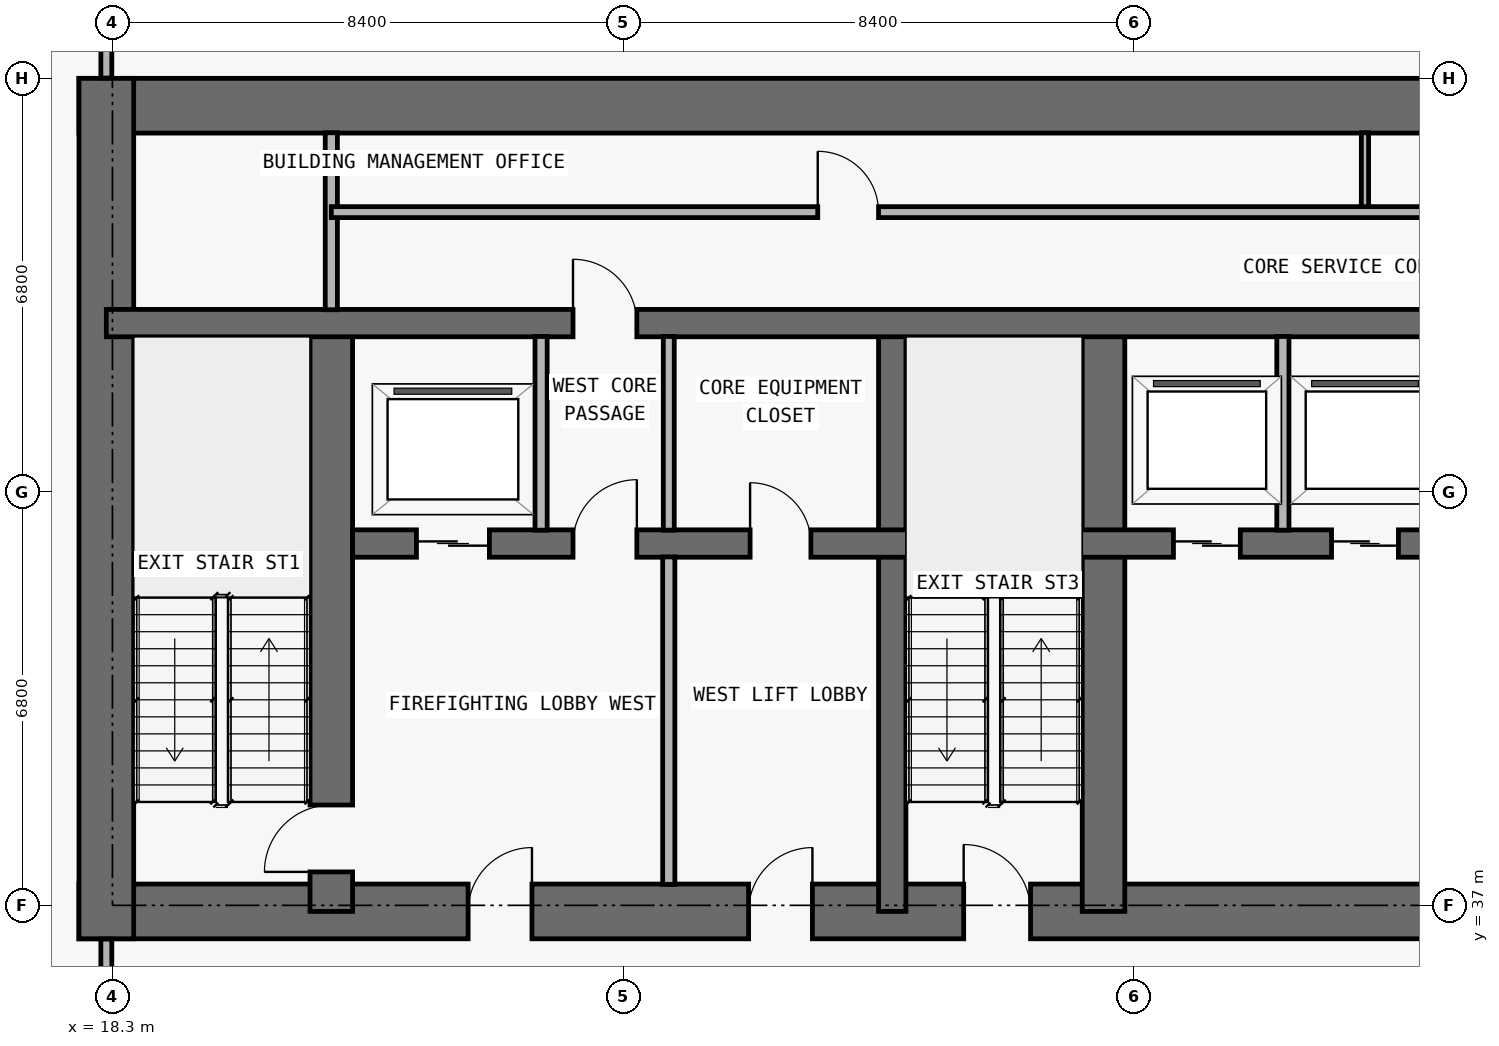
"""IFC4 building model, lengths in metres.
Left out: names, types, materials, properties, quantities, classifications, styles, units other than length and angle.
Written with IfcOpenShell. Run it as: python <this file> out.ifc"""

import sys

from ifc_helpers import new_model, si_unit, direction, frame, frame_2d, origin, place, context, subcontext, project, spatial, rectangle, extrude, element, fill, save


model = new_model("IFC4")
c1 = context("Model", 3, precision=1e-05, world=origin(), true_north=direction((0.0, 1.0)))
c2 = subcontext(c1, "Body", "Model", "MODEL_VIEW")
j1 = project(units=[si_unit("LENGTHUNIT", "METRE"), si_unit("PLANEANGLEUNIT", "RADIAN")], contexts=[c1])
p1 = place(None, origin())
s1 = spatial("IfcSite", under=j1, at=p1, CompositionType="ELEMENT")
p2 = place(p1, origin())
s2 = spatial("IfcBuilding", under=s1, at=p2, CompositionType="ELEMENT")
p3 = place(p2, frame((0.0, 0.0, -9.0)))
s3 = spatial("IfcBuildingStorey", under=s2, at=p3, CompositionType="ELEMENT", Elevation=-9.0)
p4 = place(p3, frame((17.75, 36.9, 0.0), z_axis=(0.0, 0.0, 1.0), x_axis=(1.0, 0.0, 0.0)))
e1 = element("IfcWall", 1, at=p4, inside=s3, PredefinedType="SHEAR", context=c2, shape_type="SweptSolid", body=[
    extrude(rectangle(XDim=42.3, YDim=0.9, at=frame_2d((21.15, 0.0))), origin(), (0.0, 0.0, 1.0), 4.2),
])
p5 = place(p4, frame((14.55, 0.0, 0.0)))
e2 = element("IfcOpeningElement", 2, at=p5, cuts=e1, PredefinedType="OPENING", context=c2, shape_type="SweptSolid", body=[
    extrude(rectangle(XDim=1.1, YDim=2.15, at=frame_2d((0.55, 1.075))), frame((0.0, 0.46, 0.0), z_axis=(0.0, -1.0, 0.0), x_axis=(1.0, 0.0, 0.0)), (0.0, 0.0, 1.0), 0.92),
])
p6 = place(p4, frame((6.4, 0.0, 0.0)))
e3 = element("IfcOpeningElement", 3, at=p6, cuts=e1, PredefinedType="OPENING", context=c2, shape_type="SweptSolid", body=[
    extrude(rectangle(XDim=1.05, YDim=2.15, at=frame_2d((0.525, 1.075))), frame((0.0, 0.46, 0.0), z_axis=(0.0, -1.0, 0.0), x_axis=(1.0, 0.0, 0.0)), (0.0, 0.0, 1.0), 0.92),
])
p7 = place(p4, frame((34.9, 0.0, 0.0)))
e4 = element("IfcOpeningElement", 4, at=p7, cuts=e1, PredefinedType="OPENING", context=c2, shape_type="SweptSolid", body=[
    extrude(rectangle(XDim=1.05, YDim=2.15, at=frame_2d((0.525, 1.075))), frame((0.0, 0.46, 0.0), z_axis=(0.0, -1.0, 0.0), x_axis=(1.0, 0.0, 0.0)), (0.0, 0.0, 1.0), 0.92),
])
p8 = place(p4, frame((11.012, 0.0, 0.0)))
e5 = element("IfcOpeningElement", 5, at=p8, cuts=e1, PredefinedType="OPENING", context=c2, shape_type="SweptSolid", body=[
    extrude(rectangle(XDim=1.05, YDim=2.15, at=frame_2d((0.525, 1.075))), frame((0.0, 0.46, 0.0), z_axis=(0.0, -1.0, 0.0), x_axis=(1.0, 0.0, 0.0)), (0.0, 0.0, 1.0), 0.92),
])
p9 = place(p4, frame((24.25, 0.0, 0.0)))
e6 = element("IfcOpeningElement", 6, at=p9, cuts=e1, PredefinedType="OPENING", context=c2, shape_type="SweptSolid", body=[
    extrude(rectangle(XDim=1.05, YDim=2.15, at=frame_2d((0.525, 1.075))), frame((0.0, 0.46, 0.0), z_axis=(0.0, -1.0, 0.0), x_axis=(1.0, 0.0, 0.0)), (0.0, 0.0, 1.0), 0.92),
])
p10 = place(p3, frame((17.75, 50.15, 0.0), z_axis=(0.0, 0.0, 1.0), x_axis=(1.0, 0.0, 0.0)))
e7 = element("IfcWall", 7, at=p10, inside=s3, PredefinedType="SHEAR", context=c2, shape_type="SweptSolid", body=[
    extrude(rectangle(XDim=42.3, YDim=0.9, at=frame_2d((21.15, 0.0))), origin(), (0.0, 0.0, 1.0), 4.2),
])
p11 = place(p3, frame((18.2, 36.45, 0.0), z_axis=(0.0, 0.0, 1.0), x_axis=(0.0, 1.0, 0.0)))
e8 = element("IfcWall", 8, at=p11, inside=s3, PredefinedType="SHEAR", context=c2, shape_type="SweptSolid", body=[
    extrude(rectangle(XDim=14.15, YDim=0.9, at=frame_2d((7.075, 0.0))), origin(), (0.0, 0.0, 1.0), 4.2),
])
p12 = place(p3, frame((21.9, 36.9, 0.0), z_axis=(0.0, 0.0, 1.0), x_axis=(0.0, 1.0, 0.0)))
e9 = element("IfcWall", 9, at=p12, inside=s3, PredefinedType="SHEAR", context=c2, shape_type="SweptSolid", body=[
    extrude(rectangle(XDim=9.675, YDim=0.7, at=frame_2d((4.837, 0.0))), origin(), (0.0, 0.0, 1.0), 4.2),
])
p13 = place(p12, frame((0.65, 0.0, 0.0)))
e10 = element("IfcOpeningElement", 10, at=p13, cuts=e9, PredefinedType="OPENING", context=c2, shape_type="SweptSolid", body=[
    extrude(rectangle(XDim=1.1, YDim=2.15, at=frame_2d((0.55, 1.075))), frame((0.0, 0.36, 0.0), z_axis=(0.0, -1.0, 0.0), x_axis=(1.0, 0.0, 0.0)), (0.0, 0.0, 1.0), 0.72),
])
p14 = place(p3, frame((31.125, 36.9, 0.0), z_axis=(0.0, 0.0, 1.0), x_axis=(0.0, 1.0, 0.0)))
e11 = element("IfcWall", 11, at=p14, inside=s3, PredefinedType="SHEAR", context=c2, shape_type="SweptSolid", body=[
    extrude(rectangle(XDim=9.675, YDim=0.45, at=frame_2d((4.837, 0.0))), origin(), (0.0, 0.0, 1.0), 4.2),
])
p15 = place(p3, frame((34.6, 36.9, 0.0), z_axis=(0.0, 0.0, 1.0), x_axis=(0.0, 1.0, 0.0)))
e12 = element("IfcWall", 12, at=p15, inside=s3, PredefinedType="SHEAR", context=c2, shape_type="SweptSolid", body=[
    extrude(rectangle(XDim=9.675, YDim=0.7, at=frame_2d((4.837, 0.0))), origin(), (0.0, 0.0, 1.0), 4.2),
])
p16 = place(p3, frame((22.25, 42.95, 0.0), z_axis=(0.0, 0.0, 1.0), x_axis=(1.0, 0.0, 0.0)))
e13 = element("IfcWall", 13, at=p16, inside=s3, PredefinedType="SHEAR", context=c2, shape_type="SweptSolid", body=[
    extrude(rectangle(XDim=33.3, YDim=0.45, at=frame_2d((16.65, 0.0))), origin(), (0.0, 0.0, 1.0), 4.2),
])
p17 = place(p16, frame((1.05, 0.0, 0.0)))
e14 = element("IfcOpeningElement", 14, at=p17, cuts=e13, PredefinedType="OPENING", context=c2, shape_type="SweptSolid", body=[
    extrude(rectangle(XDim=1.2, YDim=2.2, at=frame_2d((0.6, 1.1))), frame((0.0, 0.235, 0.0), z_axis=(0.0, -1.0, 0.0), x_axis=(1.0, 0.0, 0.0)), (0.0, 0.0, 1.0), 0.47),
])
p18 = place(p16, frame((31.05, 0.0, 0.0)))
e15 = element("IfcOpeningElement", 15, at=p18, cuts=e13, PredefinedType="OPENING", context=c2, shape_type="SweptSolid", body=[
    extrude(rectangle(XDim=1.2, YDim=2.2, at=frame_2d((0.6, 1.1))), frame((0.0, 0.235, 0.0), z_axis=(0.0, -1.0, 0.0), x_axis=(1.0, 0.0, 0.0)), (0.0, 0.0, 1.0), 0.47),
])
p19 = place(p16, frame((13.5, 0.0, 0.0)))
e16 = element("IfcOpeningElement", 16, at=p19, cuts=e13, PredefinedType="OPENING", context=c2, shape_type="SweptSolid", body=[
    extrude(rectangle(XDim=1.1, YDim=2.2, at=frame_2d((0.55, 1.1))), frame((0.0, 0.235, 0.0), z_axis=(0.0, -1.0, 0.0), x_axis=(1.0, 0.0, 0.0)), (0.0, 0.0, 1.0), 0.47),
])
p20 = place(p16, frame((16.1, 0.0, 0.0)))
e17 = element("IfcOpeningElement", 17, at=p20, cuts=e13, PredefinedType="OPENING", context=c2, shape_type="SweptSolid", body=[
    extrude(rectangle(XDim=1.1, YDim=2.2, at=frame_2d((0.55, 1.1))), frame((0.0, 0.235, 0.0), z_axis=(0.0, -1.0, 0.0), x_axis=(1.0, 0.0, 0.0)), (0.0, 0.0, 1.0), 0.47),
])
p21 = place(p16, frame((18.7, 0.0, 0.0)))
e18 = element("IfcOpeningElement", 18, at=p21, cuts=e13, PredefinedType="OPENING", context=c2, shape_type="SweptSolid", body=[
    extrude(rectangle(XDim=1.1, YDim=2.2, at=frame_2d((0.55, 1.1))), frame((0.0, 0.235, 0.0), z_axis=(0.0, -1.0, 0.0), x_axis=(1.0, 0.0, 0.0)), (0.0, 0.0, 1.0), 0.47),
])
p22 = place(p16, frame((3.625, 0.0, 0.0)))
e19 = element("IfcOpeningElement", 19, at=p22, cuts=e13, PredefinedType="OPENING", context=c2, shape_type="SweptSolid", body=[
    extrude(rectangle(XDim=1.05, YDim=2.15, at=frame_2d((0.525, 1.075))), frame((0.0, 0.235, 0.0), z_axis=(0.0, -1.0, 0.0), x_axis=(1.0, 0.0, 0.0)), (0.0, 0.0, 1.0), 0.47),
])
p23 = place(p16, frame((28.675, 0.0, 0.0)))
e20 = element("IfcOpeningElement", 20, at=p23, cuts=e13, PredefinedType="OPENING", context=c2, shape_type="SweptSolid", body=[
    extrude(rectangle(XDim=1.05, YDim=2.15, at=frame_2d((0.525, 1.075))), frame((0.0, 0.235, 0.0), z_axis=(0.0, -1.0, 0.0), x_axis=(1.0, 0.0, 0.0)), (0.0, 0.0, 1.0), 0.47),
])
p24 = place(p16, frame((6.538, 0.0, 0.0)))
e21 = element("IfcOpeningElement", 21, at=p24, cuts=e13, PredefinedType="OPENING", context=c2, shape_type="SweptSolid", body=[
    extrude(rectangle(XDim=1.0, YDim=2.2, at=frame_2d((0.5, 1.1))), frame((0.0, 0.235, 0.0), z_axis=(0.0, -1.0, 0.0), x_axis=(1.0, 0.0, 0.0)), (0.0, 0.0, 1.0), 0.47),
])
p25 = place(p16, frame((21.9, 0.0, 0.0)))
e22 = element("IfcOpeningElement", 22, at=p25, cuts=e13, PredefinedType="OPENING", context=c2, shape_type="SweptSolid", body=[
    extrude(rectangle(XDim=1.2, YDim=2.2, at=frame_2d((0.6, 1.1))), frame((0.0, 0.235, 0.0), z_axis=(0.0, -1.0, 0.0), x_axis=(1.0, 0.0, 0.0)), (0.0, 0.0, 1.0), 0.47),
])
p26 = place(p16, frame((25.7, 0.0, 0.0)))
e23 = element("IfcOpeningElement", 23, at=p26, cuts=e13, PredefinedType="OPENING", context=c2, shape_type="SweptSolid", body=[
    extrude(rectangle(XDim=1.2, YDim=2.2, at=frame_2d((0.6, 1.1))), frame((0.0, 0.235, 0.0), z_axis=(0.0, -1.0, 0.0), x_axis=(1.0, 0.0, 0.0)), (0.0, 0.0, 1.0), 0.47),
])
p27 = place(p3, frame((18.2, 46.575, 0.0), z_axis=(0.0, 0.0, 1.0), x_axis=(1.0, 0.0, 0.0)))
e24 = element("IfcWall", 24, at=p27, inside=s3, PredefinedType="SHEAR", context=c2, shape_type="SweptSolid", body=[
    extrude(rectangle(XDim=41.4, YDim=0.45, at=frame_2d((20.7, 0.0))), origin(), (0.0, 0.0, 1.0), 4.2),
])
p28 = place(p27, frame((7.675, 0.0, 0.0)))
e25 = element("IfcOpeningElement", 25, at=p28, cuts=e24, PredefinedType="OPENING", context=c2, shape_type="SweptSolid", body=[
    extrude(rectangle(XDim=1.05, YDim=2.15, at=frame_2d((0.525, 1.075))), frame((0.0, 0.235, 0.0), z_axis=(0.0, -1.0, 0.0), x_axis=(1.0, 0.0, 0.0)), (0.0, 0.0, 1.0), 0.47),
])
p29 = place(p27, frame((32.725, 0.0, 0.0)))
e26 = element("IfcOpeningElement", 26, at=p29, cuts=e24, PredefinedType="OPENING", context=c2, shape_type="SweptSolid", body=[
    extrude(rectangle(XDim=1.05, YDim=2.15, at=frame_2d((0.525, 1.075))), frame((0.0, 0.235, 0.0), z_axis=(0.0, -1.0, 0.0), x_axis=(1.0, 0.0, 0.0)), (0.0, 0.0, 1.0), 0.47),
])
p30 = place(p3, frame((18.2, 34.4, 0.0), z_axis=(0.0, 0.0, 1.0), x_axis=(0.0, 1.0, 0.0)))
e27 = element("IfcWall", 27, at=p30, inside=s3, PredefinedType="PARTITIONING", context=c2, shape_type="SweptSolid", body=[
    extrude(rectangle(XDim=2.045, YDim=0.18, at=frame_2d((1.022, 0.0))), origin(), (0.0, 0.0, 1.0), 3.085),
])
p31 = place(p3, frame((18.2, 50.605, 0.0), z_axis=(0.0, 0.0, 1.0), x_axis=(0.0, 1.0, 0.0)))
e28 = element("IfcWall", 28, at=p31, inside=s3, PredefinedType="PARTITIONING", context=c2, shape_type="SweptSolid", body=[
    extrude(rectangle(XDim=2.695, YDim=0.18, at=frame_2d((1.348, 0.0))), origin(), (0.0, 0.0, 1.0), 4.2),
])
p32 = place(p3, frame((21.9, 46.795, 0.0), z_axis=(0.0, 0.0, 1.0), x_axis=(0.0, 1.0, 0.0)))
e29 = element("IfcWall", 29, at=p32, inside=s3, PredefinedType="PARTITIONING", context=c2, shape_type="SweptSolid", body=[
    extrude(rectangle(XDim=2.91, YDim=0.2, at=frame_2d((1.455, 0.0))), origin(), (0.0, 0.0, 1.0), 4.2),
])
p33 = place(p3, frame((25.35, 43.17, 0.0), z_axis=(0.0, 0.0, 1.0), x_axis=(0.0, 1.0, 0.0)))
e30 = element("IfcWall", 30, at=p33, inside=s3, PredefinedType="PARTITIONING", context=c2, shape_type="SweptSolid", body=[
    extrude(rectangle(XDim=3.185, YDim=0.2, at=frame_2d((1.593, 0.0))), origin(), (0.0, 0.0, 1.0), 4.2),
])
p34 = place(p3, frame((27.45, 37.345, 0.0), z_axis=(0.0, 0.0, 1.0), x_axis=(0.0, 1.0, 0.0)))
e31 = element("IfcWall", 31, at=p34, inside=s3, PredefinedType="PARTITIONING", context=c2, shape_type="SweptSolid", body=[
    extrude(rectangle(XDim=5.385, YDim=0.2, at=frame_2d((2.692, 0.0))), origin(), (0.0, 0.0, 1.0), 4.2),
])
p35 = place(p3, frame((27.45, 43.17, 0.0), z_axis=(0.0, 0.0, 1.0), x_axis=(0.0, 1.0, 0.0)))
e32 = element("IfcWall", 32, at=p35, inside=s3, PredefinedType="PARTITIONING", context=c2, shape_type="SweptSolid", body=[
    extrude(rectangle(XDim=3.185, YDim=0.18, at=frame_2d((1.593, 0.0))), origin(), (0.0, 0.0, 1.0), 4.2),
])
p36 = place(p3, frame((37.55, 43.17, 0.0), z_axis=(0.0, 0.0, 1.0), x_axis=(0.0, 1.0, 0.0)))
e33 = element("IfcWall", 33, at=p36, inside=s3, PredefinedType="PARTITIONING", context=c2, shape_type="SweptSolid", body=[
    extrude(rectangle(XDim=3.185, YDim=0.2, at=frame_2d((1.593, 0.0))), origin(), (0.0, 0.0, 1.0), 4.2),
])
p37 = place(p3, frame((38.9, 48.4, 0.0), z_axis=(0.0, 0.0, 1.0), x_axis=(0.0, 1.0, 0.0)))
e34 = element("IfcWall", 34, at=p37, inside=s3, PredefinedType="PARTITIONING", context=c2, shape_type="SweptSolid", body=[
    extrude(rectangle(XDim=1.305, YDim=0.12, at=frame_2d((0.653, 0.0))), origin(), (0.0, 0.0, 1.0), 4.2),
])
p38 = place(p3, frame((21.9, 48.4, 0.0), z_axis=(0.0, 0.0, 1.0), x_axis=(1.0, 0.0, 0.0)))
e35 = element("IfcWall", 35, at=p38, inside=s3, PredefinedType="PARTITIONING", context=c2, shape_type="SweptSolid", body=[
    extrude(rectangle(XDim=34.0, YDim=0.18, at=frame_2d((17.0, 0.0))), origin(), (0.0, 0.0, 1.0), 4.2),
])
p39 = place(p38, frame((8.0, 0.0, 0.0)))
e36 = element("IfcOpeningElement", 36, at=p39, cuts=e35, PredefinedType="OPENING", context=c2, shape_type="SweptSolid", body=[
    extrude(rectangle(XDim=1.0, YDim=2.2, at=frame_2d((0.5, 1.1))), frame((0.0, 0.1, 0.0), z_axis=(0.0, -1.0, 0.0), x_axis=(1.0, 0.0, 0.0)), (0.0, 0.0, 1.0), 0.2),
])
p40 = place(p38, frame((25.0, 0.0, 0.0)))
e37 = element("IfcOpeningElement", 37, at=p40, cuts=e35, PredefinedType="OPENING", context=c2, shape_type="SweptSolid", body=[
    extrude(rectangle(XDim=1.0, YDim=2.2, at=frame_2d((0.5, 1.1))), frame((0.0, 0.1, 0.0), z_axis=(0.0, -1.0, 0.0), x_axis=(1.0, 0.0, 0.0)), (0.0, 0.0, 1.0), 0.2),
])
p41 = place(p17, origin())
e38 = element("IfcDoor", 38, at=p41, inside=s3, OperationType="DOUBLE_DOOR_SLIDING", PredefinedType="DOOR", context=c2, shape_type="SweptSolid", body=[
    extrude(rectangle(XDim=1.2, YDim=2.2, at=frame_2d((0.6, 1.1))), frame((0.0, 0.025, 0.0), z_axis=(0.0, -1.0, 0.0), x_axis=(1.0, 0.0, 0.0)), (0.0, 0.0, 1.0), 0.05),
])
fill(e14, e38)
p42 = place(p19, origin())
e39 = element("IfcDoor", 39, at=p42, inside=s3, OperationType="DOUBLE_DOOR_SLIDING", PredefinedType="DOOR", context=c2, shape_type="SweptSolid", body=[
    extrude(rectangle(XDim=1.1, YDim=2.2, at=frame_2d((0.55, 1.1))), frame((0.0, 0.025, 0.0), z_axis=(0.0, -1.0, 0.0), x_axis=(1.0, 0.0, 0.0)), (0.0, 0.0, 1.0), 0.05),
])
fill(e16, e39)
p43 = place(p20, origin())
e40 = element("IfcDoor", 40, at=p43, inside=s3, OperationType="DOUBLE_DOOR_SLIDING", PredefinedType="DOOR", context=c2, shape_type="SweptSolid", body=[
    extrude(rectangle(XDim=1.1, YDim=2.2, at=frame_2d((0.55, 1.1))), frame((0.0, 0.025, 0.0), z_axis=(0.0, -1.0, 0.0), x_axis=(1.0, 0.0, 0.0)), (0.0, 0.0, 1.0), 0.05),
])
fill(e17, e40)
p44 = place(p5, origin())
e41 = element("IfcDoor", 41, at=p44, inside=s3, OperationType="SINGLE_SWING_LEFT", PredefinedType="DOOR", context=c2, shape_type="SweptSolid", body=[
    extrude(rectangle(XDim=1.1, YDim=2.15, at=frame_2d((0.55, 1.075))), frame((0.0, 0.025, 0.0), z_axis=(0.0, -1.0, 0.0), x_axis=(1.0, 0.0, 0.0)), (0.0, 0.0, 1.0), 0.05),
])
fill(e2, e41)
p45 = place(p6, origin())
e42 = element("IfcDoor", 42, at=p45, inside=s3, OperationType="SINGLE_SWING_RIGHT", PredefinedType="DOOR", context=c2, shape_type="SweptSolid", body=[
    extrude(rectangle(XDim=1.05, YDim=2.15, at=frame_2d((0.525, 1.075))), frame((0.0, 0.025, 0.0), z_axis=(0.0, -1.0, 0.0), x_axis=(1.0, 0.0, 0.0)), (0.0, 0.0, 1.0), 0.05),
])
fill(e3, e42)
p46 = place(p13, origin())
e43 = element("IfcDoor", 43, at=p46, inside=s3, OperationType="SINGLE_SWING_LEFT", PredefinedType="DOOR", context=c2, shape_type="SweptSolid", body=[
    extrude(rectangle(XDim=1.1, YDim=2.15, at=frame_2d((0.55, 1.075))), frame((0.0, 0.025, 0.0), z_axis=(0.0, -1.0, 0.0), x_axis=(1.0, 0.0, 0.0)), (0.0, 0.0, 1.0), 0.05),
])
fill(e10, e43)
p47 = place(p22, origin())
e44 = element("IfcDoor", 44, at=p47, inside=s3, OperationType="SINGLE_SWING_RIGHT", PredefinedType="DOOR", context=c2, shape_type="SweptSolid", body=[
    extrude(rectangle(XDim=1.05, YDim=2.15, at=frame_2d((0.525, 1.075))), frame((0.0, 0.025, 0.0), z_axis=(0.0, -1.0, 0.0), x_axis=(1.0, 0.0, 0.0)), (0.0, 0.0, 1.0), 0.05),
])
fill(e19, e44)
p48 = place(p8, origin())
e45 = element("IfcDoor", 45, at=p48, inside=s3, OperationType="SINGLE_SWING_RIGHT", PredefinedType="DOOR", context=c2, shape_type="SweptSolid", body=[
    extrude(rectangle(XDim=1.05, YDim=2.15, at=frame_2d((0.525, 1.075))), frame((0.0, 0.025, 0.0), z_axis=(0.0, -1.0, 0.0), x_axis=(1.0, 0.0, 0.0)), (0.0, 0.0, 1.0), 0.05),
])
fill(e5, e45)
p49 = place(p24, origin())
e46 = element("IfcDoor", 46, at=p49, inside=s3, OperationType="SINGLE_SWING_LEFT", PredefinedType="DOOR", context=c2, shape_type="SweptSolid", body=[
    extrude(rectangle(XDim=1.0, YDim=2.2, at=frame_2d((0.5, 1.1))), frame((0.0, 0.025, 0.0), z_axis=(0.0, -1.0, 0.0), x_axis=(1.0, 0.0, 0.0)), (0.0, 0.0, 1.0), 0.05),
])
fill(e21, e46)
p50 = place(p28, origin())
e47 = element("IfcDoor", 47, at=p50, inside=s3, OperationType="SINGLE_SWING_LEFT", PredefinedType="DOOR", context=c2, shape_type="SweptSolid", body=[
    extrude(rectangle(XDim=1.05, YDim=2.15, at=frame_2d((0.525, 1.075))), frame((0.0, 0.025, 0.0), z_axis=(0.0, -1.0, 0.0), x_axis=(1.0, 0.0, 0.0)), (0.0, 0.0, 1.0), 0.05),
])
fill(e25, e47)
p51 = place(p39, origin())
e48 = element("IfcDoor", 48, at=p51, inside=s3, OperationType="SINGLE_SWING_LEFT", PredefinedType="DOOR", context=c2, shape_type="SweptSolid", body=[
    extrude(rectangle(XDim=1.0, YDim=2.2, at=frame_2d((0.5, 1.1))), frame((0.0, 0.025, 0.0), z_axis=(0.0, -1.0, 0.0), x_axis=(1.0, 0.0, 0.0)), (0.0, 0.0, 1.0), 0.05),
])
fill(e36, e48)
save(model, sys.argv[1])
